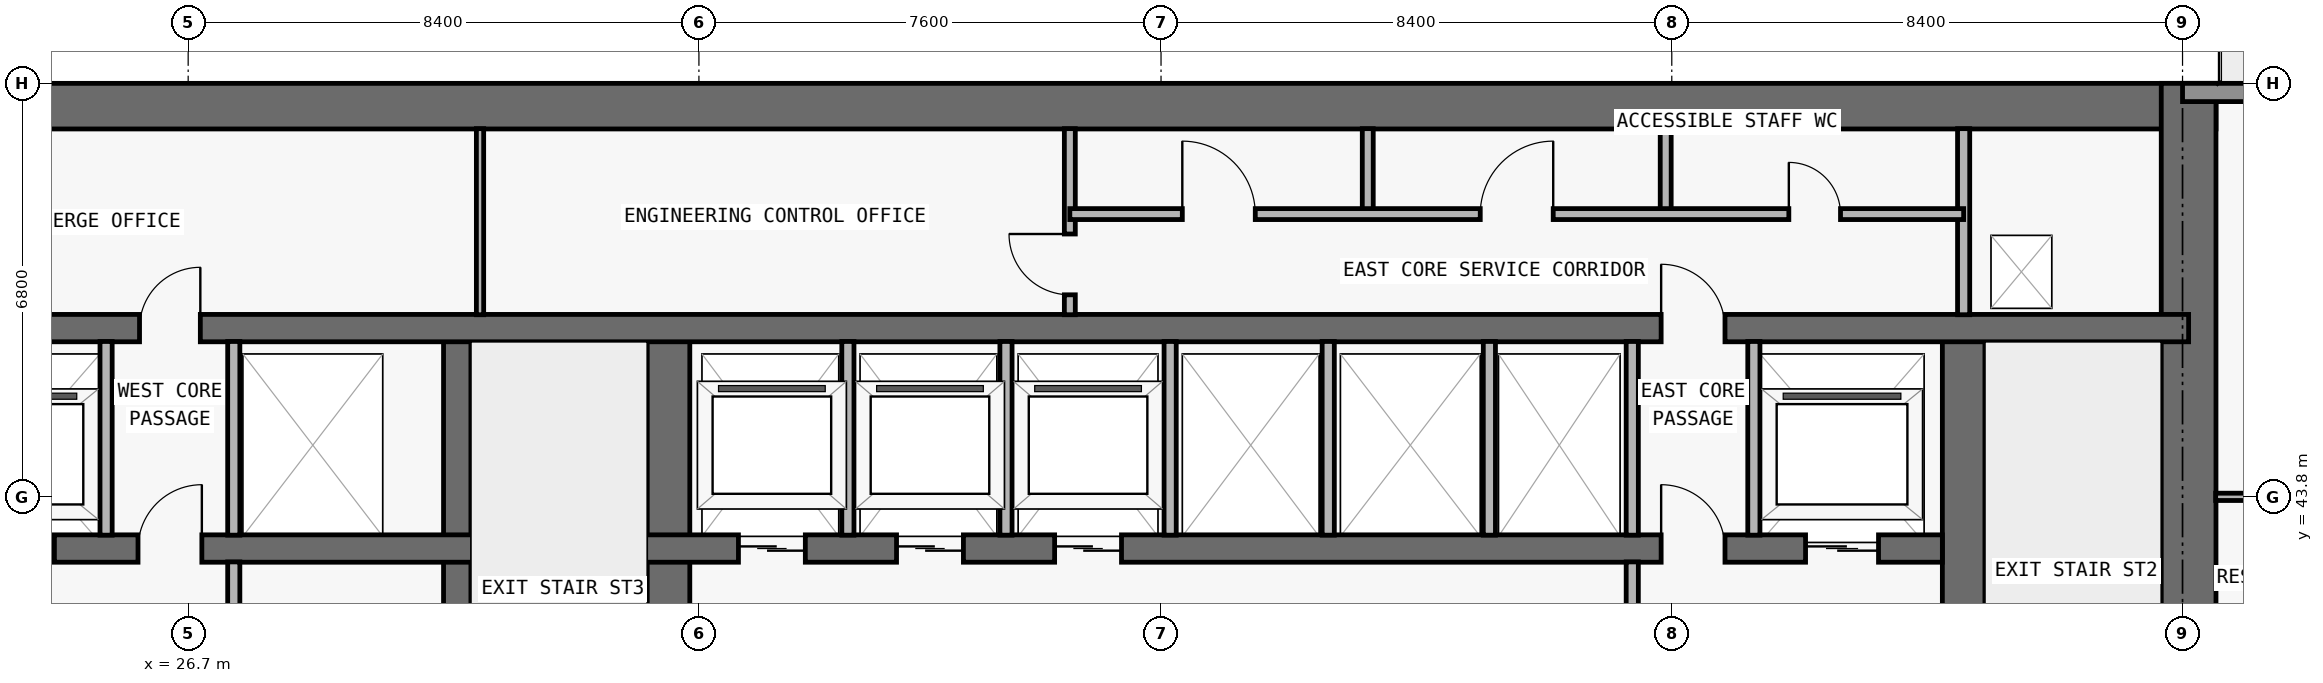
"""IFC4 building model, lengths in metres.
Left out: names, types, materials, properties, quantities, classifications, styles, units other than length and angle.
Written with IfcOpenShell. Run it as: python <this file> out.ifc"""

import sys

from ifc_helpers import new_model, si_unit, direction, frame, frame_2d, origin, place, context, subcontext, project, spatial, rectangle, extrude, element, fill, save


model = new_model("IFC4")
c1 = context("Model", 3, precision=1e-05, world=origin(), true_north=direction((0.0, 1.0)))
c2 = subcontext(c1, "Body", "Model", "MODEL_VIEW")
j1 = project(units=[si_unit("LENGTHUNIT", "METRE"), si_unit("PLANEANGLEUNIT", "RADIAN")], contexts=[c1])
p1 = place(None, origin())
s1 = spatial("IfcSite", under=j1, at=p1, CompositionType="ELEMENT")
p2 = place(p1, origin())
s2 = spatial("IfcBuilding", under=s1, at=p2, CompositionType="ELEMENT")
p3 = place(p2, frame((0.0, 0.0, 59.7)))
s3 = spatial("IfcBuildingStorey", under=s2, at=p3, CompositionType="ELEMENT", Elevation=59.7)
p4 = place(p3, frame((17.75, 50.225, 0.0), z_axis=(0.0, 0.0, 1.0), x_axis=(1.0, 0.0, 0.0)))
e1 = element("IfcWall", 1, at=p4, inside=s3, PredefinedType="SHEAR", context=c2, shape_type="SweptSolid", body=[
    extrude(rectangle(XDim=42.3, YDim=0.75, at=frame_2d((21.15, 0.0))), origin(), (0.0, 0.0, 1.0), 3.05),
])
p5 = place(p3, frame((59.6, 36.45, 0.0), z_axis=(0.0, 0.0, 1.0), x_axis=(0.0, 1.0, 0.0)))
e2 = element("IfcWall", 2, at=p5, inside=s3, PredefinedType="SHEAR", context=c2, shape_type="SweptSolid", body=[
    extrude(rectangle(XDim=14.15, YDim=0.9, at=frame_2d((7.075, 0.0))), origin(), (0.0, 0.0, 1.0), 3.05),
])
p6 = place(p3, frame((55.9, 36.9, 0.0), z_axis=(0.0, 0.0, 1.0), x_axis=(0.0, 1.0, 0.0)))
e3 = element("IfcWall", 3, at=p6, inside=s3, PredefinedType="SHEAR", context=c2, shape_type="SweptSolid", body=[
    extrude(rectangle(XDim=9.675, YDim=0.7, at=frame_2d((4.837, 0.0))), origin(), (0.0, 0.0, 1.0), 3.05),
])
p7 = place(p6, frame((0.65, 0.0, 0.0)))
e4 = element("IfcOpeningElement", 4, at=p7, cuts=e3, PredefinedType="OPENING", context=c2, shape_type="SweptSolid", body=[
    extrude(rectangle(XDim=1.1, YDim=2.15, at=frame_2d((0.55, 1.075))), frame((0.0, 0.36, 0.0), z_axis=(0.0, -1.0, 0.0), x_axis=(1.0, 0.0, 0.0)), (0.0, 0.0, 1.0), 0.72),
])
p8 = place(p3, frame((31.125, 36.9, 0.0), z_axis=(0.0, 0.0, 1.0), x_axis=(0.0, 1.0, 0.0)))
e5 = element("IfcWall", 5, at=p8, inside=s3, PredefinedType="SHEAR", context=c2, shape_type="SweptSolid", body=[
    extrude(rectangle(XDim=9.675, YDim=0.45, at=frame_2d((4.837, 0.0))), origin(), (0.0, 0.0, 1.0), 3.05),
])
p9 = place(p3, frame((34.6, 36.9, 0.0), z_axis=(0.0, 0.0, 1.0), x_axis=(0.0, 1.0, 0.0)))
e6 = element("IfcWall", 6, at=p9, inside=s3, PredefinedType="SHEAR", context=c2, shape_type="SweptSolid", body=[
    extrude(rectangle(XDim=9.675, YDim=0.7, at=frame_2d((4.837, 0.0))), origin(), (0.0, 0.0, 1.0), 3.05),
])
p10 = place(p3, frame((22.25, 42.95, 0.0), z_axis=(0.0, 0.0, 1.0), x_axis=(1.0, 0.0, 0.0)))
e7 = element("IfcWall", 7, at=p10, inside=s3, PredefinedType="SHEAR", context=c2, shape_type="SweptSolid", body=[
    extrude(rectangle(XDim=33.3, YDim=0.45, at=frame_2d((16.65, 0.0))), origin(), (0.0, 0.0, 1.0), 3.05),
])
p11 = place(p10, frame((1.05, 0.0, 0.0)))
e8 = element("IfcOpeningElement", 8, at=p11, cuts=e7, PredefinedType="OPENING", context=c2, shape_type="SweptSolid", body=[
    extrude(rectangle(XDim=1.2, YDim=2.2, at=frame_2d((0.6, 1.1))), frame((0.0, 0.235, 0.0), z_axis=(0.0, -1.0, 0.0), x_axis=(1.0, 0.0, 0.0)), (0.0, 0.0, 1.0), 0.47),
])
p12 = place(p10, frame((31.05, 0.0, 0.0)))
e9 = element("IfcOpeningElement", 9, at=p12, cuts=e7, PredefinedType="OPENING", context=c2, shape_type="SweptSolid", body=[
    extrude(rectangle(XDim=1.2, YDim=2.2, at=frame_2d((0.6, 1.1))), frame((0.0, 0.235, 0.0), z_axis=(0.0, -1.0, 0.0), x_axis=(1.0, 0.0, 0.0)), (0.0, 0.0, 1.0), 0.47),
])
p13 = place(p10, frame((13.5, 0.0, 0.0)))
e10 = element("IfcOpeningElement", 10, at=p13, cuts=e7, PredefinedType="OPENING", context=c2, shape_type="SweptSolid", body=[
    extrude(rectangle(XDim=1.1, YDim=2.2, at=frame_2d((0.55, 1.1))), frame((0.0, 0.235, 0.0), z_axis=(0.0, -1.0, 0.0), x_axis=(1.0, 0.0, 0.0)), (0.0, 0.0, 1.0), 0.47),
])
p14 = place(p10, frame((16.1, 0.0, 0.0)))
e11 = element("IfcOpeningElement", 11, at=p14, cuts=e7, PredefinedType="OPENING", context=c2, shape_type="SweptSolid", body=[
    extrude(rectangle(XDim=1.1, YDim=2.2, at=frame_2d((0.55, 1.1))), frame((0.0, 0.235, 0.0), z_axis=(0.0, -1.0, 0.0), x_axis=(1.0, 0.0, 0.0)), (0.0, 0.0, 1.0), 0.47),
])
p15 = place(p10, frame((18.7, 0.0, 0.0)))
e12 = element("IfcOpeningElement", 12, at=p15, cuts=e7, PredefinedType="OPENING", context=c2, shape_type="SweptSolid", body=[
    extrude(rectangle(XDim=1.1, YDim=2.2, at=frame_2d((0.55, 1.1))), frame((0.0, 0.235, 0.0), z_axis=(0.0, -1.0, 0.0), x_axis=(1.0, 0.0, 0.0)), (0.0, 0.0, 1.0), 0.47),
])
p16 = place(p10, frame((3.625, 0.0, 0.0)))
e13 = element("IfcOpeningElement", 13, at=p16, cuts=e7, PredefinedType="OPENING", context=c2, shape_type="SweptSolid", body=[
    extrude(rectangle(XDim=1.05, YDim=2.15, at=frame_2d((0.525, 1.075))), frame((0.0, 0.235, 0.0), z_axis=(0.0, -1.0, 0.0), x_axis=(1.0, 0.0, 0.0)), (0.0, 0.0, 1.0), 0.47),
])
p17 = place(p10, frame((28.675, 0.0, 0.0)))
e14 = element("IfcOpeningElement", 14, at=p17, cuts=e7, PredefinedType="OPENING", context=c2, shape_type="SweptSolid", body=[
    extrude(rectangle(XDim=1.05, YDim=2.15, at=frame_2d((0.525, 1.075))), frame((0.0, 0.235, 0.0), z_axis=(0.0, -1.0, 0.0), x_axis=(1.0, 0.0, 0.0)), (0.0, 0.0, 1.0), 0.47),
])
p18 = place(p3, frame((18.2, 46.575, 0.0), z_axis=(0.0, 0.0, 1.0), x_axis=(1.0, 0.0, 0.0)))
e15 = element("IfcWall", 15, at=p18, inside=s3, PredefinedType="SHEAR", context=c2, shape_type="SweptSolid", body=[
    extrude(rectangle(XDim=41.4, YDim=0.45, at=frame_2d((20.7, 0.0))), origin(), (0.0, 0.0, 1.0), 3.05),
])
p19 = place(p18, frame((7.7, 0.0, 0.0)))
e16 = element("IfcOpeningElement", 16, at=p19, cuts=e15, PredefinedType="OPENING", context=c2, shape_type="SweptSolid", body=[
    extrude(rectangle(XDim=1.0, YDim=2.2, at=frame_2d((0.5, 1.1))), frame((0.0, 0.235, 0.0), z_axis=(0.0, -1.0, 0.0), x_axis=(1.0, 0.0, 0.0)), (0.0, 0.0, 1.0), 0.47),
])
p20 = place(p18, frame((32.725, 0.0, 0.0)))
e17 = element("IfcOpeningElement", 17, at=p20, cuts=e15, PredefinedType="OPENING", context=c2, shape_type="SweptSolid", body=[
    extrude(rectangle(XDim=1.05, YDim=2.15, at=frame_2d((0.525, 1.075))), frame((0.0, 0.235, 0.0), z_axis=(0.0, -1.0, 0.0), x_axis=(1.0, 0.0, 0.0)), (0.0, 0.0, 1.0), 0.47),
])
p21 = place(p3, frame((59.5, 50.45, 0.0), z_axis=(0.0, 0.0, 1.0), x_axis=(1.0, 0.0, 0.0)))
e18 = element("IfcWall", 18, at=p21, inside=s3, PredefinedType="STANDARD", context=c2, shape_type="SweptSolid", body=[
    extrude(rectangle(XDim=13.2, YDim=0.3, at=frame_2d((6.6, 0.0))), origin(), (0.0, 0.0, 1.0), 3.05),
])
p22 = place(p21, frame((5.6, 0.0, 0.0)))
e19 = element("IfcOpeningElement", 19, at=p22, cuts=e18, PredefinedType="OPENING", context=c2, shape_type="SweptSolid", body=[
    extrude(rectangle(XDim=2.0, YDim=2.3, at=frame_2d((1.0, 1.15))), frame((0.0, 0.16, 0.0), z_axis=(0.0, -1.0, 0.0), x_axis=(1.0, 0.0, 0.0)), (0.0, 0.0, 1.0), 0.32),
])
p23 = place(p3, frame((25.35, 43.17, 0.0), z_axis=(0.0, 0.0, 1.0), x_axis=(0.0, 1.0, 0.0)))
e20 = element("IfcWall", 20, at=p23, inside=s3, PredefinedType="PARTITIONING", context=c2, shape_type="SweptSolid", body=[
    extrude(rectangle(XDim=3.185, YDim=0.2, at=frame_2d((1.593, 0.0))), origin(), (0.0, 0.0, 1.0), 3.05),
])
p24 = place(p3, frame((27.45, 37.345, 0.0), z_axis=(0.0, 0.0, 1.0), x_axis=(0.0, 1.0, 0.0)))
e21 = element("IfcWall", 21, at=p24, inside=s3, PredefinedType="PARTITIONING", context=c2, shape_type="SweptSolid", body=[
    extrude(rectangle(XDim=5.385, YDim=0.2, at=frame_2d((2.692, 0.0))), origin(), (0.0, 0.0, 1.0), 3.05),
])
p25 = place(p3, frame((27.45, 43.17, 0.0), z_axis=(0.0, 0.0, 1.0), x_axis=(0.0, 1.0, 0.0)))
e22 = element("IfcWall", 22, at=p25, inside=s3, PredefinedType="PARTITIONING", context=c2, shape_type="SweptSolid", body=[
    extrude(rectangle(XDim=3.185, YDim=0.2, at=frame_2d((1.593, 0.0))), origin(), (0.0, 0.0, 1.0), 3.05),
])
p26 = place(p3, frame((31.5, 46.795, 0.0), z_axis=(0.0, 0.0, 1.0), x_axis=(0.0, 1.0, 0.0)))
e23 = element("IfcWall", 23, at=p26, inside=s3, PredefinedType="PARTITIONING", context=c2, shape_type="SweptSolid", body=[
    extrude(rectangle(XDim=3.06, YDim=0.12, at=frame_2d((1.53, 0.0))), origin(), (0.0, 0.0, 1.0), 3.05),
])
for number, where, z_axis, x_axis in (
    (24, (37.55, 43.17, 0.0), (0.0, 0.0, 1.0), (0.0, 1.0, 0.0)),
    (25, (40.15, 43.17, 0.0), (0.0, 0.0, 1.0), (0.0, 1.0, 0.0)),
):
    element("IfcWall", number, at=place(p3, frame(where, z_axis=z_axis, x_axis=x_axis)), inside=s3, PredefinedType="PARTITIONING", context=c2, shape_type="SweptSolid", body=[
        extrude(rectangle(XDim=3.185, YDim=0.2, at=frame_2d((1.593, 0.0))), origin(), (0.0, 0.0, 1.0), 3.05),
    ])
p27 = place(p3, frame((41.2, 46.795, 0.0), z_axis=(0.0, 0.0, 1.0), x_axis=(0.0, 1.0, 0.0)))
e26 = element("IfcWall", 26, at=p27, inside=s3, PredefinedType="PARTITIONING", context=c2, shape_type="SweptSolid", body=[
    extrude(rectangle(XDim=3.06, YDim=0.18, at=frame_2d((1.53, 0.0))), origin(), (0.0, 0.0, 1.0), 3.05),
])
p28 = place(p27, frame((0.327, 0.0, 0.0)))
e27 = element("IfcOpeningElement", 27, at=p28, cuts=e26, PredefinedType="OPENING", context=c2, shape_type="SweptSolid", body=[
    extrude(rectangle(XDim=1.0, YDim=2.2, at=frame_2d((0.5, 1.1))), frame((0.0, 0.1, 0.0), z_axis=(0.0, -1.0, 0.0), x_axis=(1.0, 0.0, 0.0)), (0.0, 0.0, 1.0), 0.2),
])
for number, where, z_axis, x_axis in (
    (28, (42.85, 43.17, 0.0), (0.0, 0.0, 1.0), (0.0, 1.0, 0.0)),
    (29, (45.45, 43.17, 0.0), (0.0, 0.0, 1.0), (0.0, 1.0, 0.0)),
):
    element("IfcWall", number, at=place(p3, frame(where, z_axis=z_axis, x_axis=x_axis)), inside=s3, PredefinedType="PARTITIONING", context=c2, shape_type="SweptSolid", body=[
        extrude(rectangle(XDim=3.185, YDim=0.2, at=frame_2d((1.593, 0.0))), origin(), (0.0, 0.0, 1.0), 3.05),
    ])
p29 = place(p3, frame((46.1, 48.45, 0.0), z_axis=(0.0, 0.0, 1.0), x_axis=(0.0, 1.0, 0.0)))
e30 = element("IfcWall", 30, at=p29, inside=s3, PredefinedType="PARTITIONING", context=c2, shape_type="SweptSolid", body=[
    extrude(rectangle(XDim=1.405, YDim=0.18, at=frame_2d((0.703, 0.0))), origin(), (0.0, 0.0, 1.0), 3.05),
])
p30 = place(p3, frame((48.1, 43.17, 0.0), z_axis=(0.0, 0.0, 1.0), x_axis=(0.0, 1.0, 0.0)))
e31 = element("IfcWall", 31, at=p30, inside=s3, PredefinedType="PARTITIONING", context=c2, shape_type="SweptSolid", body=[
    extrude(rectangle(XDim=3.185, YDim=0.2, at=frame_2d((1.593, 0.0))), origin(), (0.0, 0.0, 1.0), 3.05),
])
p31 = place(p3, frame((50.45, 37.345, 0.0), z_axis=(0.0, 0.0, 1.0), x_axis=(0.0, 1.0, 0.0)))
e32 = element("IfcWall", 32, at=p31, inside=s3, PredefinedType="PARTITIONING", context=c2, shape_type="SweptSolid", body=[
    extrude(rectangle(XDim=5.385, YDim=0.2, at=frame_2d((2.692, 0.0))), origin(), (0.0, 0.0, 1.0), 3.05),
])
p32 = place(p3, frame((50.45, 43.17, 0.0), z_axis=(0.0, 0.0, 1.0), x_axis=(0.0, 1.0, 0.0)))
e33 = element("IfcWall", 33, at=p32, inside=s3, PredefinedType="PARTITIONING", context=c2, shape_type="SweptSolid", body=[
    extrude(rectangle(XDim=3.185, YDim=0.2, at=frame_2d((1.593, 0.0))), origin(), (0.0, 0.0, 1.0), 3.05),
])
p33 = place(p3, frame((51.0, 48.45, 0.0), z_axis=(0.0, 0.0, 1.0), x_axis=(0.0, 1.0, 0.0)))
e34 = element("IfcWall", 34, at=p33, inside=s3, PredefinedType="PARTITIONING", context=c2, shape_type="SweptSolid", body=[
    extrude(rectangle(XDim=1.405, YDim=0.18, at=frame_2d((0.703, 0.0))), origin(), (0.0, 0.0, 1.0), 3.05),
])
p34 = place(p3, frame((52.45, 43.17, 0.0), z_axis=(0.0, 0.0, 1.0), x_axis=(0.0, 1.0, 0.0)))
e35 = element("IfcWall", 35, at=p34, inside=s3, PredefinedType="PARTITIONING", context=c2, shape_type="SweptSolid", body=[
    extrude(rectangle(XDim=3.185, YDim=0.2, at=frame_2d((1.593, 0.0))), origin(), (0.0, 0.0, 1.0), 3.05),
])
p35 = place(p3, frame((55.9, 46.795, 0.0), z_axis=(0.0, 0.0, 1.0), x_axis=(0.0, 1.0, 0.0)))
e36 = element("IfcWall", 36, at=p35, inside=s3, PredefinedType="PARTITIONING", context=c2, shape_type="SweptSolid", body=[
    extrude(rectangle(XDim=3.06, YDim=0.2, at=frame_2d((1.53, 0.0))), origin(), (0.0, 0.0, 1.0), 3.05),
])
p36 = place(p3, frame((60.045, 43.8, 0.0), z_axis=(0.0, 0.0, 1.0), x_axis=(1.0, 0.0, 0.0)))
e37 = element("IfcWall", 37, at=p36, inside=s3, PredefinedType="PARTITIONING", context=c2, shape_type="SweptSolid", body=[
    extrude(rectangle(XDim=15.96, YDim=0.12, at=frame_2d((7.98, 0.0))), origin(), (0.0, 0.0, 1.0), 2.339),
])
p37 = place(p36, frame((9.805, 0.0, 0.0)))
e38 = element("IfcOpeningElement", 38, at=p37, cuts=e37, PredefinedType="OPENING", context=c2, shape_type="SweptSolid", body=[
    extrude(rectangle(XDim=0.9, YDim=2.15, at=frame_2d((0.45, 1.075))), frame((0.0, 0.07, 0.0), z_axis=(0.0, -1.0, 0.0), x_axis=(1.0, 0.0, 0.0)), (0.0, 0.0, 1.0), 0.14),
])
p38 = place(p36, frame((4.58, 0.0, 0.0)))
e39 = element("IfcOpeningElement", 39, at=p38, cuts=e37, PredefinedType="OPENING", context=c2, shape_type="SweptSolid", body=[
    extrude(rectangle(XDim=0.9, YDim=2.15, at=frame_2d((0.45, 1.075))), frame((0.0, 0.07, 0.0), z_axis=(0.0, -1.0, 0.0), x_axis=(1.0, 0.0, 0.0)), (0.0, 0.0, 1.0), 0.14),
])
p39 = place(p36, frame((0.677, 0.0, 0.0)))
e40 = element("IfcOpeningElement", 40, at=p39, cuts=e37, PredefinedType="OPENING", context=c2, shape_type="SweptSolid", body=[
    extrude(rectangle(XDim=0.85, YDim=2.1, at=frame_2d((0.425, 1.05))), frame((0.0, 0.07, 0.0), z_axis=(0.0, -1.0, 0.0), x_axis=(1.0, 0.0, 0.0)), (0.0, 0.0, 1.0), 0.14),
])
p40 = place(p3, frame((41.2, 48.45, 0.0), z_axis=(0.0, 0.0, 1.0), x_axis=(1.0, 0.0, 0.0)))
e41 = element("IfcWall", 41, at=p40, inside=s3, PredefinedType="PARTITIONING", context=c2, shape_type="SweptSolid", body=[
    extrude(rectangle(XDim=14.7, YDim=0.18, at=frame_2d((7.35, 0.0))), origin(), (0.0, 0.0, 1.0), 3.05),
])
p41 = place(p40, frame((1.85, 0.0, 0.0)))
e42 = element("IfcOpeningElement", 42, at=p41, cuts=e41, PredefinedType="OPENING", context=c2, shape_type="SweptSolid", body=[
    extrude(rectangle(XDim=1.2, YDim=2.2, at=frame_2d((0.6, 1.1))), frame((0.0, 0.1, 0.0), z_axis=(0.0, -1.0, 0.0), x_axis=(1.0, 0.0, 0.0)), (0.0, 0.0, 1.0), 0.2),
])
p42 = place(p40, frame((6.75, 0.0, 0.0)))
e43 = element("IfcOpeningElement", 43, at=p42, cuts=e41, PredefinedType="OPENING", context=c2, shape_type="SweptSolid", body=[
    extrude(rectangle(XDim=1.2, YDim=2.2, at=frame_2d((0.6, 1.1))), frame((0.0, 0.1, 0.0), z_axis=(0.0, -1.0, 0.0), x_axis=(1.0, 0.0, 0.0)), (0.0, 0.0, 1.0), 0.2),
])
p43 = place(p40, frame((11.825, 0.0, 0.0)))
e44 = element("IfcOpeningElement", 44, at=p43, cuts=e41, PredefinedType="OPENING", context=c2, shape_type="SweptSolid", body=[
    extrude(rectangle(XDim=0.85, YDim=2.1, at=frame_2d((0.425, 1.05))), frame((0.0, 0.1, 0.0), z_axis=(0.0, -1.0, 0.0), x_axis=(1.0, 0.0, 0.0)), (0.0, 0.0, 1.0), 0.2),
])
p44 = place(p11, origin())
e45 = element("IfcDoor", 45, at=p44, inside=s3, OperationType="DOUBLE_DOOR_SLIDING", PredefinedType="DOOR", context=c2, shape_type="SweptSolid", body=[
    extrude(rectangle(XDim=1.2, YDim=2.2, at=frame_2d((0.6, 1.1))), frame((0.0, 0.025, 0.0), z_axis=(0.0, -1.0, 0.0), x_axis=(1.0, 0.0, 0.0)), (0.0, 0.0, 1.0), 0.05),
])
fill(e8, e45)
p45 = place(p12, origin())
e46 = element("IfcDoor", 46, at=p45, inside=s3, OperationType="DOUBLE_DOOR_SLIDING", PredefinedType="DOOR", context=c2, shape_type="SweptSolid", body=[
    extrude(rectangle(XDim=1.2, YDim=2.2, at=frame_2d((0.6, 1.1))), frame((0.0, 0.025, 0.0), z_axis=(0.0, -1.0, 0.0), x_axis=(1.0, 0.0, 0.0)), (0.0, 0.0, 1.0), 0.05),
])
fill(e9, e46)
p46 = place(p13, origin())
e47 = element("IfcDoor", 47, at=p46, inside=s3, OperationType="DOUBLE_DOOR_SLIDING", PredefinedType="DOOR", context=c2, shape_type="SweptSolid", body=[
    extrude(rectangle(XDim=1.1, YDim=2.2, at=frame_2d((0.55, 1.1))), frame((0.0, 0.025, 0.0), z_axis=(0.0, -1.0, 0.0), x_axis=(1.0, 0.0, 0.0)), (0.0, 0.0, 1.0), 0.05),
])
fill(e10, e47)
p47 = place(p14, origin())
e48 = element("IfcDoor", 48, at=p47, inside=s3, OperationType="DOUBLE_DOOR_SLIDING", PredefinedType="DOOR", context=c2, shape_type="SweptSolid", body=[
    extrude(rectangle(XDim=1.1, YDim=2.2, at=frame_2d((0.55, 1.1))), frame((0.0, 0.025, 0.0), z_axis=(0.0, -1.0, 0.0), x_axis=(1.0, 0.0, 0.0)), (0.0, 0.0, 1.0), 0.05),
])
fill(e11, e48)
p48 = place(p15, origin())
e49 = element("IfcDoor", 49, at=p48, inside=s3, OperationType="DOUBLE_DOOR_SLIDING", PredefinedType="DOOR", context=c2, shape_type="SweptSolid", body=[
    extrude(rectangle(XDim=1.1, YDim=2.2, at=frame_2d((0.55, 1.1))), frame((0.0, 0.025, 0.0), z_axis=(0.0, -1.0, 0.0), x_axis=(1.0, 0.0, 0.0)), (0.0, 0.0, 1.0), 0.05),
])
fill(e12, e49)
p49 = place(p16, origin())
e50 = element("IfcDoor", 50, at=p49, inside=s3, OperationType="SINGLE_SWING_RIGHT", PredefinedType="DOOR", context=c2, shape_type="SweptSolid", body=[
    extrude(rectangle(XDim=1.05, YDim=2.15, at=frame_2d((0.525, 1.075))), frame((0.0, 0.025, 0.0), z_axis=(0.0, -1.0, 0.0), x_axis=(1.0, 0.0, 0.0)), (0.0, 0.0, 1.0), 0.05),
])
fill(e13, e50)
p50 = place(p17, origin())
e51 = element("IfcDoor", 51, at=p50, inside=s3, OperationType="SINGLE_SWING_LEFT", PredefinedType="DOOR", context=c2, shape_type="SweptSolid", body=[
    extrude(rectangle(XDim=1.05, YDim=2.15, at=frame_2d((0.525, 1.075))), frame((0.0, 0.025, 0.0), z_axis=(0.0, -1.0, 0.0), x_axis=(1.0, 0.0, 0.0)), (0.0, 0.0, 1.0), 0.05),
])
fill(e14, e51)
p51 = place(p19, origin())
e52 = element("IfcDoor", 52, at=p51, inside=s3, OperationType="SINGLE_SWING_RIGHT", PredefinedType="DOOR", context=c2, shape_type="SweptSolid", body=[
    extrude(rectangle(XDim=1.0, YDim=2.2, at=frame_2d((0.5, 1.1))), frame((0.0, 0.025, 0.0), z_axis=(0.0, -1.0, 0.0), x_axis=(1.0, 0.0, 0.0)), (0.0, 0.0, 1.0), 0.05),
])
fill(e16, e52)
p52 = place(p20, origin())
e53 = element("IfcDoor", 53, at=p52, inside=s3, OperationType="SINGLE_SWING_LEFT", PredefinedType="DOOR", context=c2, shape_type="SweptSolid", body=[
    extrude(rectangle(XDim=1.05, YDim=2.15, at=frame_2d((0.525, 1.075))), frame((0.0, 0.025, 0.0), z_axis=(0.0, -1.0, 0.0), x_axis=(1.0, 0.0, 0.0)), (0.0, 0.0, 1.0), 0.05),
])
fill(e17, e53)
p53 = place(p28, origin())
e54 = element("IfcDoor", 54, at=p53, inside=s3, OperationType="SINGLE_SWING_RIGHT", PredefinedType="DOOR", context=c2, shape_type="SweptSolid", body=[
    extrude(rectangle(XDim=1.0, YDim=2.2, at=frame_2d((0.5, 1.1))), frame((0.0, 0.025, 0.0), z_axis=(0.0, -1.0, 0.0), x_axis=(1.0, 0.0, 0.0)), (0.0, 0.0, 1.0), 0.05),
])
fill(e27, e54)
p54 = place(p41, origin())
e55 = element("IfcDoor", 55, at=p54, inside=s3, OperationType="SINGLE_SWING_LEFT", PredefinedType="DOOR", context=c2, shape_type="SweptSolid", body=[
    extrude(rectangle(XDim=1.2, YDim=2.2, at=frame_2d((0.6, 1.1))), frame((0.0, 0.025, 0.0), z_axis=(0.0, -1.0, 0.0), x_axis=(1.0, 0.0, 0.0)), (0.0, 0.0, 1.0), 0.05),
])
fill(e42, e55)
p55 = place(p42, origin())
e56 = element("IfcDoor", 56, at=p55, inside=s3, OperationType="SINGLE_SWING_RIGHT", PredefinedType="DOOR", context=c2, shape_type="SweptSolid", body=[
    extrude(rectangle(XDim=1.2, YDim=2.2, at=frame_2d((0.6, 1.1))), frame((0.0, 0.025, 0.0), z_axis=(0.0, -1.0, 0.0), x_axis=(1.0, 0.0, 0.0)), (0.0, 0.0, 1.0), 0.05),
])
fill(e43, e56)
p56 = place(p43, origin())
e57 = element("IfcDoor", 57, at=p56, inside=s3, OperationType="SINGLE_SWING_LEFT", PredefinedType="DOOR", context=c2, shape_type="SweptSolid", body=[
    extrude(rectangle(XDim=0.85, YDim=2.1, at=frame_2d((0.425, 1.05))), frame((0.0, 0.025, 0.0), z_axis=(0.0, -1.0, 0.0), x_axis=(1.0, 0.0, 0.0)), (0.0, 0.0, 1.0), 0.05),
])
fill(e44, e57)
save(model, sys.argv[1])
